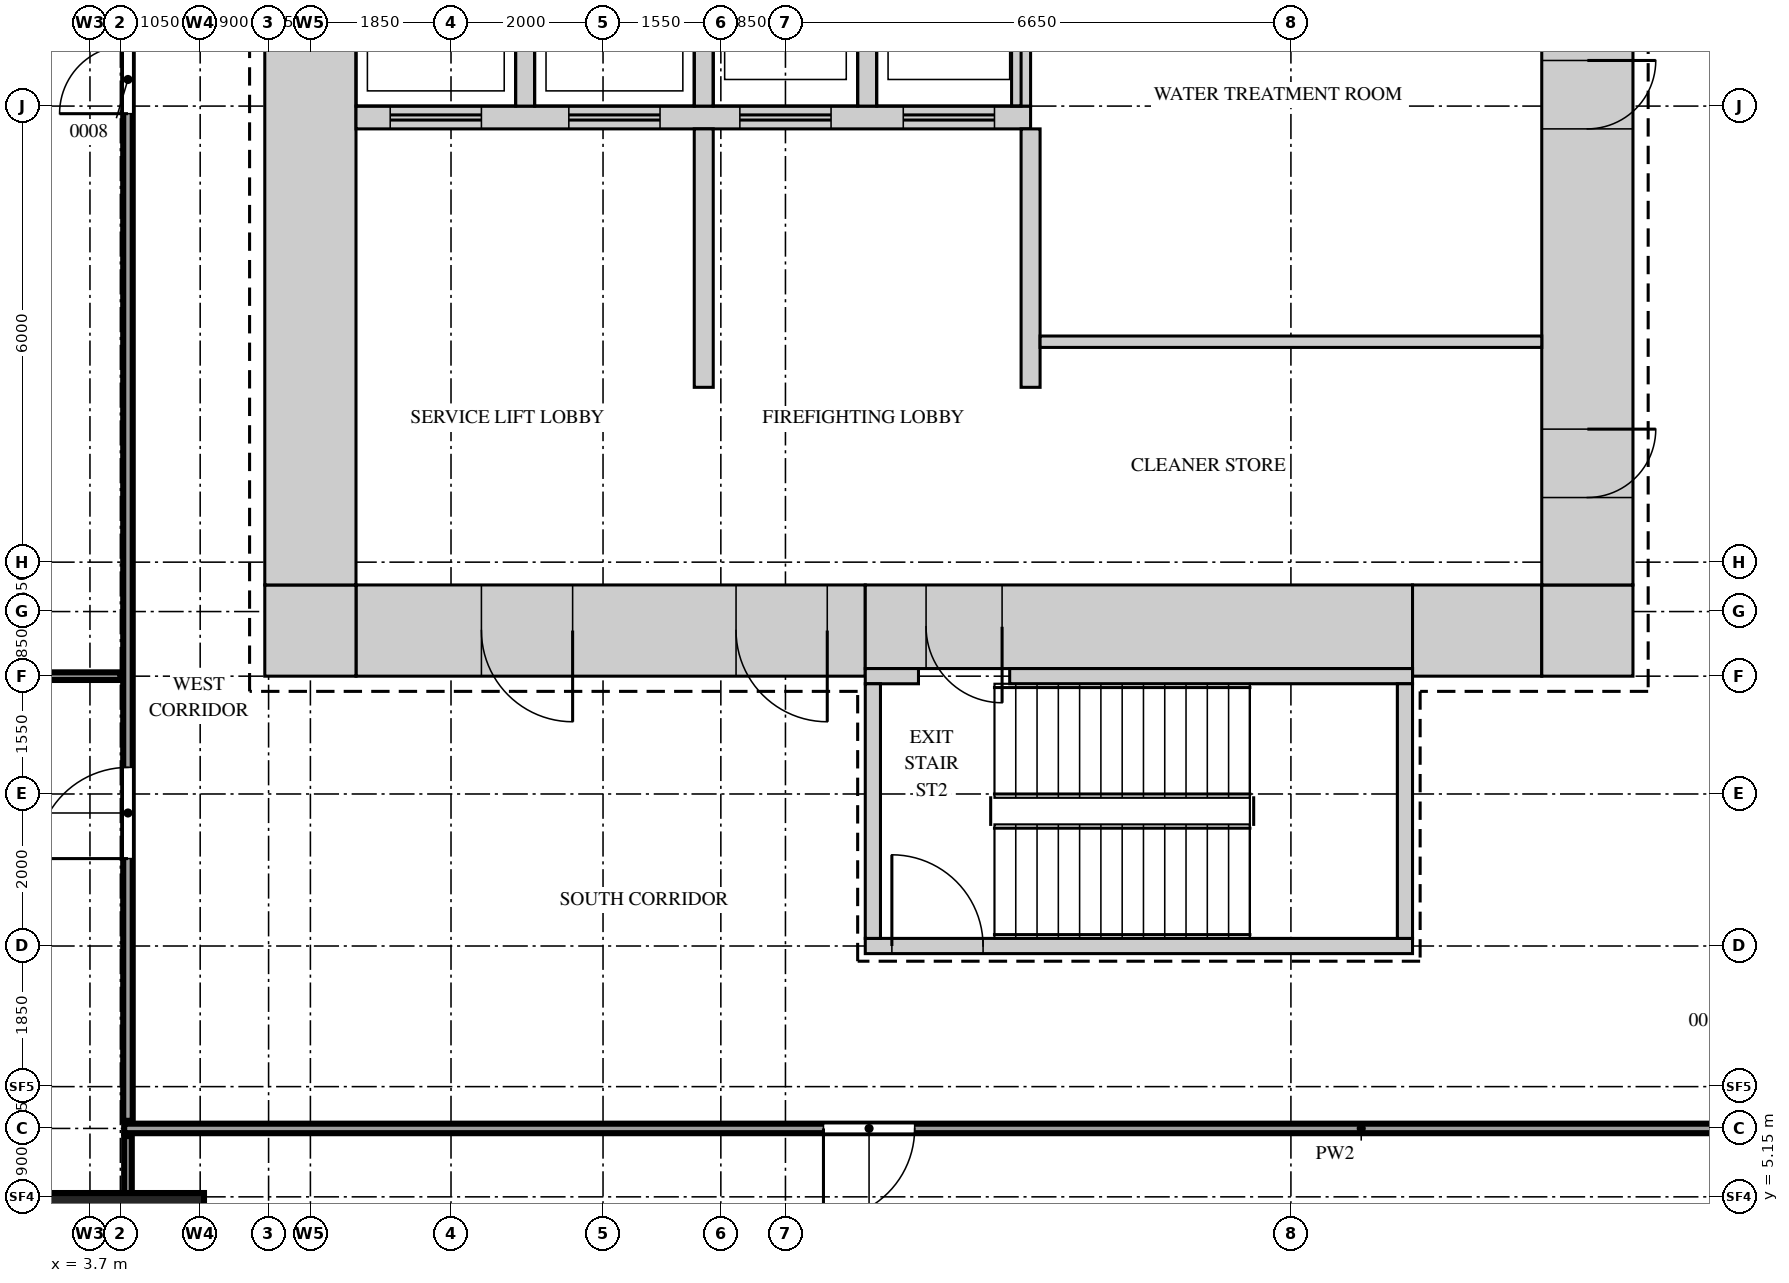
"""IFC4 building model, lengths in metres.
Left out: names, types, materials, properties, quantities, classifications, styles, units other than length and angle.
Written with IfcOpenShell. Run it as: python <this file> out.ifc"""

import sys

from ifc_helpers import new_model, si_unit, direction, frame, frame_2d, origin, origin_2d, place, context, subcontext, project, spatial, rectangle, extrude, source, transform, mapped, element, fill, save


model = new_model("IFC4")
c1 = context("Model", 3, precision=1e-05, world=origin(), true_north=direction((0.0, 1.0)))
c2 = subcontext(c1, "Body", "Model", "MODEL_VIEW")
j1 = project(units=[si_unit("LENGTHUNIT", "METRE"), si_unit("PLANEANGLEUNIT", "RADIAN")], contexts=[c1])
p1 = place(None, origin())
s1 = spatial("IfcSite", under=j1, at=p1, CompositionType="ELEMENT")
p2 = place(p1, origin())
s2 = spatial("IfcBuilding", under=s1, at=p2, CompositionType="ELEMENT")
p3 = place(p2, frame((0.0, 0.0, 78.0)))
s3 = spatial("IfcBuildingStorey", under=s2, at=p3, CompositionType="ELEMENT", Elevation=78.0)
m1 = source(origin(), c2, "Body", "SweptSolid", [
    extrude(rectangle(XDim=6.7, YDim=1.2, at=frame_2d((3.35, 0.0))), origin(), (0.0, 0.0, 1.0), 4.2),
])
p4 = place(p3, frame((7.2, 12.6, 0.0), z_axis=(0.0, 0.0, 1.0), x_axis=(1.0, 0.0, 0.0)))
e1 = element("IfcWall", 1, at=p4, inside=s3, PredefinedType="SHEAR", context=c2, shape_type="MappedRepresentation", body=[
    mapped(m1, transform((0.0, 0.0, 0.0))),
])
m2 = source(origin(), c2, "Body", "SweptSolid", [
    extrude(rectangle(XDim=1.2, YDim=2.1, at=frame_2d((0.6, 1.05))), frame((0.0, 0.61, 0.0), z_axis=(0.0, -1.0, 0.0), x_axis=(1.0, 0.0, 0.0)), (0.0, 0.0, 1.0), 1.22),
])
p5 = place(p4, frame((5.0, 0.0, 0.0)))
e2 = element("IfcOpeningElement", 2, at=p5, cuts=e1, PredefinedType="OPENING", context=c2, shape_type="MappedRepresentation", body=[
    mapped(m2, transform((0.0, 0.0, 0.0))),
])
p6 = place(p4, frame((1.65, 0.0, 0.0)))
e3 = element("IfcOpeningElement", 3, at=p6, cuts=e1, PredefinedType="OPENING", context=c2, shape_type="MappedRepresentation", body=[
    mapped(m2, transform((0.0, 0.0, 0.0))),
])
m3 = source(origin(), c2, "Body", "SweptSolid", [
    extrude(rectangle(XDim=7.2, YDim=1.1, at=frame_2d((3.6, 0.0))), origin(), (0.0, 0.0, 1.0), 4.2),
])
p7 = place(p3, frame((13.9, 12.65, 0.0), z_axis=(0.0, 0.0, 1.0), x_axis=(1.0, 0.0, 0.0)))
e4 = element("IfcWall", 4, at=p7, inside=s3, PredefinedType="SHEAR", context=c2, shape_type="MappedRepresentation", body=[
    mapped(m3, transform((0.0, 0.0, 0.0))),
])
m4 = source(origin(), c2, "Body", "SweptSolid", [
    extrude(rectangle(XDim=1.0, YDim=2.1, at=frame_2d((0.5, 1.05))), frame((0.0, 0.56, 0.0), z_axis=(0.0, -1.0, 0.0), x_axis=(1.0, 0.0, 0.0)), (0.0, 0.0, 1.0), 1.12),
])
p8 = place(p7, frame((0.8, 0.0, 0.0)))
e5 = element("IfcOpeningElement", 5, at=p8, cuts=e4, PredefinedType="OPENING", context=c2, shape_type="MappedRepresentation", body=[
    mapped(m4, transform((0.0, 0.0, 0.0))),
])
m5 = source(origin(), c2, "Body", "SweptSolid", [
    extrude(rectangle(XDim=1.7, YDim=1.2, at=frame_2d((0.85, 0.0))), origin(), (0.0, 0.0, 1.0), 4.2),
])
p9 = place(p3, frame((21.1, 12.6, 0.0), z_axis=(0.0, 0.0, 1.0), x_axis=(1.0, 0.0, 0.0)))
e6 = element("IfcWall", 6, at=p9, inside=s3, PredefinedType="SHEAR", context=c2, shape_type="MappedRepresentation", body=[
    mapped(m5, transform((0.0, 0.0, 0.0))),
])
m6 = source(origin(), c2, "Body", "SweptSolid", [
    extrude(rectangle(XDim=1.2, YDim=1.2, at=frame_2d((0.6, 0.0))), origin(), (0.0, 0.0, 1.0), 4.2),
])
for number, where, z_axis, x_axis in (
    (7, (22.8, 12.6, 0.0), (0.0, 0.0, 1.0), (1.0, 0.0, 0.0)),
    (8, (6.0, 12.6, 0.0), (0.0, 0.0, 1.0), (1.0, 0.0, 0.0)),
):
    element("IfcWall", number, at=place(p3, frame(where, z_axis=z_axis, x_axis=x_axis)), inside=s3, PredefinedType="SHEAR", context=c2, shape_type="MappedRepresentation", body=[
        mapped(m6, transform((0.0, 0.0, 0.0))),
    ])
m7 = source(origin(), c2, "Body", "SweptSolid", [
    extrude(rectangle(XDim=27.6, YDim=1.2, at=frame_2d((13.8, 0.0))), origin(), (0.0, 0.0, 1.0), 4.2),
])
p10 = place(p3, frame((23.4, 13.2, 0.0), z_axis=(0.0, 0.0, 1.0), x_axis=(0.0, 1.0, 0.0)))
e9 = element("IfcWall", 9, at=p10, inside=s3, PredefinedType="SHEAR", context=c2, shape_type="MappedRepresentation", body=[
    mapped(m7, transform((0.0, 0.0, 0.0))),
])
m8 = source(origin(), c2, "Body", "SweptSolid", [
    extrude(rectangle(XDim=1.8, YDim=2.1, at=frame_2d((0.9, 1.05))), frame((0.0, 0.61, 0.0), z_axis=(0.0, -1.0, 0.0), x_axis=(1.0, 0.0, 0.0)), (0.0, 0.0, 1.0), 1.22),
])
p11 = place(p10, frame((22.4, 0.0, 0.0)))
e10 = element("IfcOpeningElement", 10, at=p11, cuts=e9, PredefinedType="OPENING", context=c2, shape_type="MappedRepresentation", body=[
    mapped(m8, transform((0.0, 0.0, 0.0))),
])
p12 = place(p10, frame((14.4, 0.0, 0.0)))
e11 = element("IfcOpeningElement", 11, at=p12, cuts=e9, PredefinedType="OPENING", context=c2, shape_type="MappedRepresentation", body=[
    mapped(m2, transform((0.0, 0.0, 0.0))),
])
m9 = source(origin(), c2, "Body", "SweptSolid", [
    extrude(rectangle(XDim=0.9, YDim=2.1, at=frame_2d((0.45, 1.05))), frame((0.0, 0.61, 0.0), z_axis=(0.0, -1.0, 0.0), x_axis=(1.0, 0.0, 0.0)), (0.0, 0.0, 1.0), 1.22),
])
p13 = place(p10, frame((1.15, 0.0, 0.0)))
e12 = element("IfcOpeningElement", 12, at=p13, cuts=e9, PredefinedType="OPENING", context=c2, shape_type="MappedRepresentation", body=[
    mapped(m9, transform((0.0, 0.0, 0.0))),
])
p14 = place(p10, frame((6.0, 0.0, 0.0)))
e13 = element("IfcOpeningElement", 13, at=p14, cuts=e9, PredefinedType="OPENING", context=c2, shape_type="MappedRepresentation", body=[
    mapped(m9, transform((0.0, 0.0, 0.0))),
])
p15 = place(p3, frame((6.6, 13.2, 0.0), z_axis=(0.0, 0.0, 1.0), x_axis=(0.0, 1.0, 0.0)))
e14 = element("IfcWall", 14, at=p15, inside=s3, PredefinedType="SHEAR", context=c2, shape_type="MappedRepresentation", body=[
    mapped(m7, transform((0.0, 0.0, 0.0))),
])
m10 = source(origin(), c2, "Body", "SweptSolid", [
    extrude(rectangle(XDim=0.7, YDim=0.2, at=frame_2d((0.35, 0.0))), origin(), (0.0, 0.0, 1.0), 4.2),
])
p16 = place(p3, frame((13.9, 12.0, 0.0), z_axis=(0.0, 0.0, 1.0), x_axis=(1.0, 0.0, 0.0)))
e15 = element("IfcWall", 15, at=p16, inside=s3, PredefinedType="SHEAR", context=c2, shape_type="MappedRepresentation", body=[
    mapped(m10, transform((0.0, 0.0, 0.0))),
])
m11 = source(origin(), c2, "Body", "SweptSolid", [
    extrude(rectangle(XDim=5.3, YDim=0.2, at=frame_2d((2.65, 0.0))), origin(), (0.0, 0.0, 1.0), 4.2),
])
p17 = place(p3, frame((15.8, 12.0, 0.0), z_axis=(0.0, 0.0, 1.0), x_axis=(1.0, 0.0, 0.0)))
e16 = element("IfcWall", 16, at=p17, inside=s3, PredefinedType="SHEAR", context=c2, shape_type="MappedRepresentation", body=[
    mapped(m11, transform((0.0, 0.0, 0.0))),
])
m12 = source(origin(), c2, "Body", "SweptSolid", [
    extrude(rectangle(XDim=7.2, YDim=0.2, at=frame_2d((3.6, 0.0))), origin(), (0.0, 0.0, 1.0), 4.2),
])
p18 = place(p3, frame((13.9, 8.45, 0.0), z_axis=(0.0, 0.0, 1.0), x_axis=(1.0, 0.0, 0.0)))
e17 = element("IfcWall", 17, at=p18, inside=s3, PredefinedType="SHEAR", context=c2, shape_type="MappedRepresentation", body=[
    mapped(m12, transform((0.0, 0.0, 0.0))),
])
m13 = source(origin(), c2, "Body", "SweptSolid", [
    extrude(rectangle(XDim=1.2, YDim=2.1, at=frame_2d((0.6, 1.05))), frame((0.0, 0.11, 0.0), z_axis=(0.0, -1.0, 0.0), x_axis=(1.0, 0.0, 0.0)), (0.0, 0.0, 1.0), 0.22),
])
p19 = place(p18, frame((0.35, 0.0, 0.0)))
e18 = element("IfcOpeningElement", 18, at=p19, cuts=e17, PredefinedType="OPENING", context=c2, shape_type="MappedRepresentation", body=[
    mapped(m13, transform((0.0, 0.0, 0.0))),
])
m14 = source(origin(), c2, "Body", "SweptSolid", [
    extrude(rectangle(XDim=3.35, YDim=0.2, at=frame_2d((1.675, 0.0))), origin(), (0.0, 0.0, 1.0), 4.2),
])
for number, where, z_axis, x_axis in (
    (19, (21.0, 8.55, 0.0), (0.0, 0.0, 1.0), (0.0, 1.0, 0.0)),
    (20, (14.0, 8.55, 0.0), (0.0, 0.0, 1.0), (0.0, 1.0, 0.0)),
):
    element("IfcWall", number, at=place(p3, frame(where, z_axis=z_axis, x_axis=x_axis)), inside=s3, PredefinedType="SHEAR", context=c2, shape_type="MappedRepresentation", body=[
        mapped(m14, transform((0.0, 0.0, 0.0))),
    ])
m15 = source(origin(), c2, "Body", "SweptSolid", [
    extrude(rectangle(XDim=8.875, YDim=0.3, at=frame_2d((4.438, 0.0))), origin(), (0.0, 0.0, 1.0), 4.2),
])
p20 = place(p3, frame((7.2, 19.35, 0.0), z_axis=(0.0, 0.0, 1.0), x_axis=(1.0, 0.0, 0.0)))
e21 = element("IfcWall", 21, at=p20, inside=s3, PredefinedType="STANDARD", context=c2, shape_type="MappedRepresentation", body=[
    mapped(m15, transform((0.0, 0.0, 0.0))),
])
m16 = source(origin(), c2, "Body", "SweptSolid", [
    extrude(rectangle(XDim=1.2, YDim=2.1, at=frame_2d((0.6, 1.05))), frame((0.0, 0.16, 0.0), z_axis=(0.0, -1.0, 0.0), x_axis=(1.0, 0.0, 0.0)), (0.0, 0.0, 1.0), 0.32),
])
p21 = place(p20, frame((0.45, 0.0, 0.0)))
e22 = element("IfcOpeningElement", 22, at=p21, cuts=e21, PredefinedType="OPENING", context=c2, shape_type="MappedRepresentation", body=[
    mapped(m16, transform((0.0, 0.0, 0.0))),
])
p22 = place(p20, frame((2.8, 0.0, 0.0)))
e23 = element("IfcOpeningElement", 23, at=p22, cuts=e21, PredefinedType="OPENING", context=c2, shape_type="MappedRepresentation", body=[
    mapped(m16, transform((0.0, 0.0, 0.0))),
])
p23 = place(p20, frame((5.05, 0.0, 0.0)))
e24 = element("IfcOpeningElement", 24, at=p23, cuts=e21, PredefinedType="OPENING", context=c2, shape_type="MappedRepresentation", body=[
    mapped(m16, transform((0.0, 0.0, 0.0))),
])
p24 = place(p20, frame((7.2, 0.0, 0.0)))
e25 = element("IfcOpeningElement", 25, at=p24, cuts=e21, PredefinedType="OPENING", context=c2, shape_type="MappedRepresentation", body=[
    mapped(m16, transform((0.0, 0.0, 0.0))),
])
m17 = source(origin(), c2, "Body", "SweptSolid", [
    extrude(rectangle(XDim=3.1, YDim=0.25, at=frame_2d((1.55, 0.0))), origin(), (0.0, 0.0, 1.0), 4.2),
])
for number, where, z_axis, x_axis in (
    (26, (9.425, 19.5, 0.0), (0.0, 0.0, 1.0), (0.0, 1.0, 0.0)),
    (27, (11.775, 19.5, 0.0), (0.0, 0.0, 1.0), (0.0, 1.0, 0.0)),
    (28, (13.925, 19.5, 0.0), (0.0, 0.0, 1.0), (0.0, 1.0, 0.0)),
    (29, (15.95, 19.5, 0.0), (0.0, 0.0, 1.0), (0.0, 1.0, 0.0)),
):
    element("IfcWall", number, at=place(p3, frame(where, z_axis=z_axis, x_axis=x_axis)), inside=s3, PredefinedType="STANDARD", context=c2, shape_type="MappedRepresentation", body=[
        mapped(m17, transform((0.0, 0.0, 0.0))),
    ])
m18 = source(origin(), c2, "Body", "SweptSolid", [
    extrude(rectangle(XDim=3.4, YDim=0.25, at=frame_2d((1.7, 0.0))), origin(), (0.0, 0.0, 1.0), 4.2),
])
for number, where, z_axis, x_axis in (
    (30, (16.075, 15.8, 0.0), (0.0, 0.0, 1.0), (0.0, 1.0, 0.0)),
    (31, (11.775, 15.8, 0.0), (0.0, 0.0, 1.0), (0.0, 1.0, 0.0)),
):
    element("IfcWall", number, at=place(p3, frame(where, z_axis=z_axis, x_axis=x_axis)), inside=s3, PredefinedType="STANDARD", context=c2, shape_type="MappedRepresentation", body=[
        mapped(m18, transform((0.0, 0.0, 0.0))),
    ])
m19 = source(origin(), c2, "Body", "SweptSolid", [
    extrude(rectangle(XDim=2.2, YDim=2.2, at=origin_2d()), origin(), (0.0, 0.0, 1.0), 4.5),
])
p25 = place(p3, frame((4.1, 4.1, 0.0), z_axis=(0.0, 0.0, 1.0), x_axis=(1.0, 0.0, 0.0)))
e32 = element("IfcColumn", 32, at=p25, inside=s3, PredefinedType="COLUMN", context=c2, shape_type="MappedRepresentation", body=[
    mapped(m19, transform((0.0, 0.0, 0.0))),
])
m20 = source(origin(), c2, "Body", "SweptSolid", [
    extrude(rectangle(XDim=5.8, YDim=0.1, at=frame_2d((2.9, 0.0))), origin(), (0.0, 0.0, 1.0), 3.6),
])
p26 = place(p3, frame((4.2, 0.15, 0.0), z_axis=(0.0, 0.0, 1.0), x_axis=(0.0, 1.0, 0.0)))
e33 = element("IfcWall", 33, at=p26, inside=s3, PredefinedType="PARTITIONING", context=c2, shape_type="MappedRepresentation", body=[
    mapped(m20, transform((0.0, 0.0, 0.0))),
])
m21 = source(origin(), c2, "Body", "SweptSolid", [
    extrude(rectangle(XDim=22.15, YDim=0.125, at=frame_2d((11.075, 0.0))), origin(), (0.0, 0.0, 1.0), 4.3),
])
p27 = place(p3, frame((4.15, 6.05, 0.0), z_axis=(0.0, 0.0, 1.0), x_axis=(1.0, 0.0, 0.0)))
e34 = element("IfcWall", 34, at=p27, inside=s3, PredefinedType="PARTITIONING", context=c2, shape_type="MappedRepresentation", body=[
    mapped(m21, transform((0.0, 0.0, 0.0))),
])
m22 = source(origin(), c2, "Body", "SweptSolid", [
    extrude(rectangle(XDim=1.2, YDim=2.1, at=frame_2d((0.6, 1.05))), frame((0.0, 0.073, 0.0), z_axis=(0.0, -1.0, 0.0), x_axis=(1.0, 0.0, 0.0)), (0.0, 0.0, 1.0), 0.145),
])
p28 = place(p27, frame((9.2, 0.0, 0.0)))
e35 = element("IfcOpeningElement", 35, at=p28, cuts=e34, PredefinedType="OPENING", context=c2, shape_type="MappedRepresentation", body=[
    mapped(m22, transform((0.0, 0.0, 0.0))),
])
m23 = source(origin(), c2, "Body", "SweptSolid", [
    extrude(rectangle(XDim=41.8, YDim=0.125, at=frame_2d((20.9, 0.0))), origin(), (0.0, 0.0, 1.0), 4.3),
])
p29 = place(p3, frame((4.2, 6.15, 0.0), z_axis=(0.0, 0.0, 1.0), x_axis=(0.0, 1.0, 0.0)))
e36 = element("IfcWall", 36, at=p29, inside=s3, PredefinedType="PARTITIONING", context=c2, shape_type="MappedRepresentation", body=[
    mapped(m23, transform((0.0, 0.0, 0.0))),
])
p30 = place(p29, frame((3.45, 0.0, 0.0)))
e37 = element("IfcOpeningElement", 37, at=p30, cuts=e36, PredefinedType="OPENING", context=c2, shape_type="MappedRepresentation", body=[
    mapped(m22, transform((0.0, 0.0, 0.0))),
])
m24 = source(origin(), c2, "Body", "SweptSolid", [
    extrude(rectangle(XDim=0.9, YDim=2.1, at=frame_2d((0.45, 1.05))), frame((0.0, 0.073, 0.0), z_axis=(0.0, -1.0, 0.0), x_axis=(1.0, 0.0, 0.0)), (0.0, 0.0, 1.0), 0.145),
])
p31 = place(p29, frame((13.25, 0.0, 0.0)))
e38 = element("IfcOpeningElement", 38, at=p31, cuts=e36, PredefinedType="OPENING", context=c2, shape_type="MappedRepresentation", body=[
    mapped(m24, transform((0.0, 0.0, 0.0))),
])
p32 = place(p29, frame((30.35, 0.0, 0.0)))
e39 = element("IfcOpeningElement", 39, at=p32, cuts=e36, PredefinedType="OPENING", context=c2, shape_type="MappedRepresentation", body=[
    mapped(m24, transform((0.0, 0.0, 0.0))),
])
m25 = source(origin(), c2, "Body", "SweptSolid", [
    extrude(rectangle(XDim=3.95, YDim=0.1, at=frame_2d((1.975, 0.0))), origin(), (0.0, 0.0, 1.0), 4.3),
])
p33 = place(p3, frame((0.15, 12.0, 0.0), z_axis=(0.0, 0.0, 1.0), x_axis=(1.0, 0.0, 0.0)))
e40 = element("IfcWall", 40, at=p33, inside=s3, PredefinedType="PARTITIONING", context=c2, shape_type="MappedRepresentation", body=[
    mapped(m25, transform((0.0, 0.0, 0.0))),
])
m26 = source(origin(), c2, "Body", "SweptSolid", [
    extrude(rectangle(XDim=6.6, YDim=0.15, at=frame_2d((3.3, 0.0))), origin(), (0.0, 0.0, 1.0), 4.3),
])
p34 = place(p3, frame((16.2, 16.4, 0.0), z_axis=(0.0, 0.0, 1.0), x_axis=(1.0, 0.0, 0.0)))
e41 = element("IfcWall", 41, at=p34, inside=s3, PredefinedType="PARTITIONING", context=c2, shape_type="MappedRepresentation", body=[
    mapped(m26, transform((0.0, 0.0, 0.0))),
])
m27 = source(origin(), c2, "Body", "SweptSolid", [
    extrude(rectangle(XDim=0.9, YDim=2.1, at=frame_2d((0.45, 1.05))), frame((0.0, 0.55, 0.0), z_axis=(0.0, -1.0, 0.0), x_axis=(1.0, 0.0, 0.0)), (0.0, 0.0, 1.0), 1.1),
])
p35 = place(p13, origin())
e42 = element("IfcDoor", 42, at=p35, inside=s3, OperationType="SINGLE_SWING_RIGHT", PredefinedType="DOOR", context=c2, shape_type="MappedRepresentation", body=[
    mapped(m27, transform((0.0, 0.0, 0.0))),
])
fill(e12, e42)
p36 = place(p14, origin())
e43 = element("IfcDoor", 43, at=p36, inside=s3, OperationType="SINGLE_SWING_RIGHT", PredefinedType="DOOR", context=c2, shape_type="MappedRepresentation", body=[
    mapped(m27, transform((0.0, 0.0, 0.0))),
])
fill(e13, e43)
m28 = source(origin(), c2, "Body", "SweptSolid", [
    extrude(rectangle(XDim=1.2, YDim=2.1, at=frame_2d((0.6, 1.05))), frame((0.0, 0.55, 0.0), z_axis=(0.0, -1.0, 0.0), x_axis=(1.0, 0.0, 0.0)), (0.0, 0.0, 1.0), 1.1),
])
p37 = place(p5, origin())
e44 = element("IfcDoor", 44, at=p37, inside=s3, OperationType="SINGLE_SWING_RIGHT", PredefinedType="DOOR", context=c2, shape_type="MappedRepresentation", body=[
    mapped(m28, transform((0.0, 0.0, 0.0))),
])
fill(e2, e44)
p38 = place(p6, origin())
e45 = element("IfcDoor", 45, at=p38, inside=s3, OperationType="SINGLE_SWING_RIGHT", PredefinedType="DOOR", context=c2, shape_type="MappedRepresentation", body=[
    mapped(m28, transform((0.0, 0.0, 0.0))),
])
fill(e3, e45)
m29 = source(origin(), c2, "Body", "SweptSolid", [
    extrude(rectangle(XDim=1.0, YDim=2.1, at=frame_2d((0.5, 1.05))), frame((0.0, 0.5, 0.0), z_axis=(0.0, -1.0, 0.0), x_axis=(1.0, 0.0, 0.0)), (0.0, 0.0, 1.0), 1.0),
])
p39 = place(p8, origin())
e46 = element("IfcDoor", 46, at=p39, inside=s3, OperationType="SINGLE_SWING_RIGHT", PredefinedType="DOOR", context=c2, shape_type="MappedRepresentation", body=[
    mapped(m29, transform((0.0, 0.0, 0.0))),
])
fill(e5, e46)
m30 = source(origin(), c2, "Body", "SweptSolid", [
    extrude(rectangle(XDim=1.2, YDim=2.1, at=frame_2d((0.6, 1.05))), frame((0.0, 0.025, 0.0), z_axis=(0.0, -1.0, 0.0), x_axis=(1.0, 0.0, 0.0)), (0.0, 0.0, 1.0), 0.05),
])
p40 = place(p30, origin())
e47 = element("IfcDoor", 47, at=p40, inside=s3, OperationType="SINGLE_SWING_RIGHT", PredefinedType="DOOR", context=c2, shape_type="MappedRepresentation", body=[
    mapped(m30, transform((0.0, 0.0, 0.0))),
])
fill(e37, e47)
m31 = source(origin(), c2, "Body", "SweptSolid", [
    extrude(rectangle(XDim=0.9, YDim=2.1, at=frame_2d((0.45, 1.05))), frame((0.0, 0.025, 0.0), z_axis=(0.0, -1.0, 0.0), x_axis=(1.0, 0.0, 0.0)), (0.0, 0.0, 1.0), 0.05),
])
p41 = place(p31, origin())
e48 = element("IfcDoor", 48, at=p41, inside=s3, OperationType="SINGLE_SWING_RIGHT", PredefinedType="DOOR", context=c2, shape_type="MappedRepresentation", body=[
    mapped(m31, transform((0.0, 0.0, 0.0))),
])
fill(e38, e48)
p42 = place(p28, origin())
e49 = element("IfcDoor", 49, at=p42, inside=s3, OperationType="SINGLE_SWING_LEFT", PredefinedType="DOOR", context=c2, shape_type="MappedRepresentation", body=[
    mapped(m30, transform((0.0, 0.0, 0.0))),
])
fill(e35, e49)
p43 = place(p19, origin())
e50 = element("IfcDoor", 50, at=p43, inside=s3, OperationType="SINGLE_SWING_RIGHT", PredefinedType="DOOR", context=c2, shape_type="MappedRepresentation", body=[
    mapped(m30, transform((0.0, 0.0, 0.0))),
])
fill(e18, e50)
p44 = place(p21, origin())
e51 = element("IfcDoor", 51, at=p44, inside=s3, OperationType="DOUBLE_DOOR_SLIDING", PredefinedType="DOOR", context=c2, shape_type="MappedRepresentation", body=[
    mapped(m30, transform((0.0, 0.0, 0.0))),
])
fill(e22, e51)
p45 = place(p22, origin())
e52 = element("IfcDoor", 52, at=p45, inside=s3, OperationType="DOUBLE_DOOR_SLIDING", PredefinedType="DOOR", context=c2, shape_type="MappedRepresentation", body=[
    mapped(m30, transform((0.0, 0.0, 0.0))),
])
fill(e23, e52)
p46 = place(p23, origin())
e53 = element("IfcDoor", 53, at=p46, inside=s3, OperationType="DOUBLE_DOOR_SLIDING", PredefinedType="DOOR", context=c2, shape_type="MappedRepresentation", body=[
    mapped(m30, transform((0.0, 0.0, 0.0))),
])
fill(e24, e53)
p47 = place(p24, origin())
e54 = element("IfcDoor", 54, at=p47, inside=s3, OperationType="DOUBLE_DOOR_SLIDING", PredefinedType="DOOR", context=c2, shape_type="MappedRepresentation", body=[
    mapped(m30, transform((0.0, 0.0, 0.0))),
])
fill(e25, e54)
save(model, sys.argv[1])
